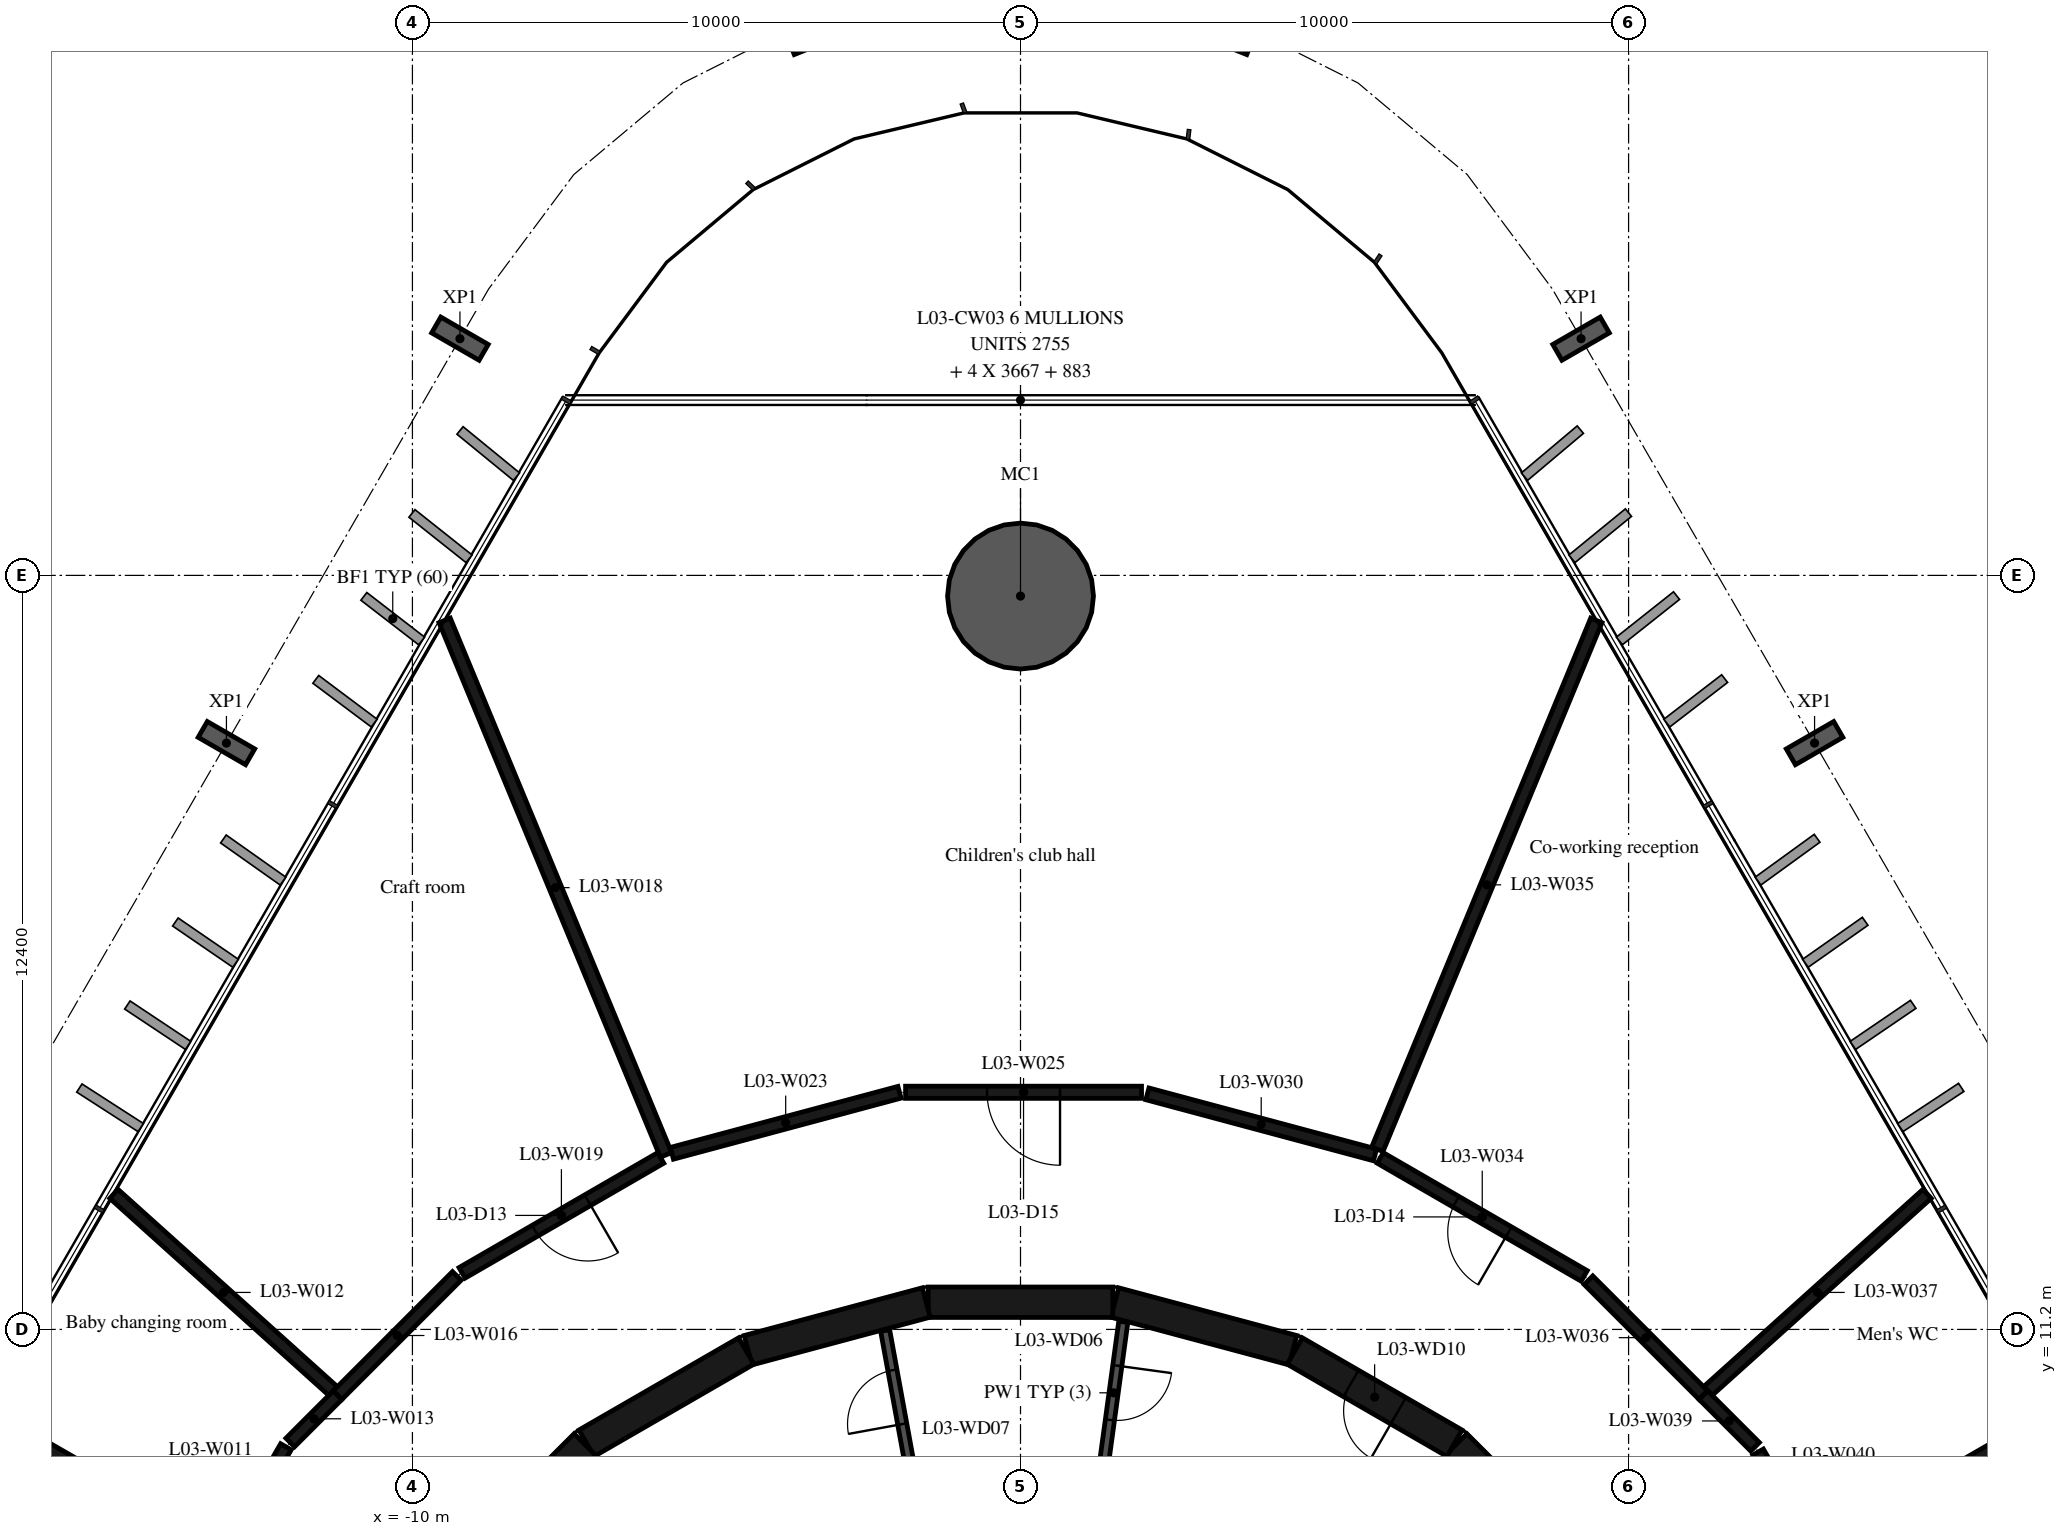
"""IFC4 building model, lengths in metres.
Left out: names, types, materials, properties, quantities, classifications, styles, units other than length and angle.
Written with IfcOpenShell. Run it as: python <this file> out.ifc"""

import sys

from ifc_helpers import new_model, si_unit, direction, frame, frame_2d, origin, origin_2d, place, context, subcontext, project, spatial, rectangle, hollow_circle, i_section, extrude, element, fill, save


model = new_model("IFC4")
c1 = context("Model", 3, precision=1e-05, world=origin(), true_north=direction((0.0, 1.0)))
c2 = subcontext(c1, "Body", "Model", "MODEL_VIEW")
j1 = project(units=[si_unit("LENGTHUNIT", "METRE"), si_unit("PLANEANGLEUNIT", "RADIAN")], contexts=[c1])
p1 = place(None, origin())
s1 = spatial("IfcSite", under=j1, at=p1, CompositionType="ELEMENT")
p2 = place(p1, origin())
s2 = spatial("IfcBuilding", under=s1, at=p2, CompositionType="ELEMENT")
p3 = place(p2, frame((0.0, 0.0, 18.6)))
s3 = spatial("IfcBuildingStorey", under=s2, at=p3, CompositionType="ELEMENT", Elevation=18.6)
p4 = place(p3, frame((0.0, 23.26, -0.38), z_axis=(0.0, 0.0, 1.0), x_axis=(1.0, 0.0, 0.0)))
e1 = element("IfcColumn", 1, at=p4, inside=s3, PredefinedType="COLUMN", context=c2, shape_type="SweptSolid", body=[
    extrude(hollow_circle(Radius=1.2, WallThickness=0.06, at=origin_2d()), origin(), (0.0, 0.0, 1.0), 4.8),
])
for number, where, z_axis, x_axis in (
    (2, (13.059, 20.842, -0.38), (0.0, 0.0, 1.0), (0.5, -0.866, 0.0)),
    (3, (9.219, 27.493, -0.38), (0.0, 0.0, 1.0), (0.5, -0.866, 0.0)),
    (4, (3.748, 32.639, -0.38), (0.0, 0.0, 1.0), (0.929, -0.371, 0.0)),
    (5, (-3.748, 32.639, -0.38), (0.0, 0.0, 1.0), (0.929, 0.371, 0.0)),
    (6, (-9.219, 27.493, -0.38), (0.0, 0.0, 1.0), (0.5, 0.866, 0.0)),
    (7, (-13.059, 20.842, -0.38), (0.0, 0.0, 1.0), (0.5, 0.866, 0.0)),
):
    element("IfcColumn", number, at=place(p3, frame(where, z_axis=z_axis, x_axis=x_axis)), inside=s3, PredefinedType="COLUMN", context=c2, shape_type="SweptSolid", body=[
        extrude(i_section(OverallWidth=0.3, OverallDepth=0.9, WebThickness=0.019, FlangeThickness=0.035, FilletRadius=0.03, at=origin_2d()), origin(), (0.0, 0.0, 1.0), 4.8),
    ])
p5 = place(p3, frame((9.308, 7.164, 0.0), z_axis=(0.0, 0.0, 1.0), x_axis=(-0.707106781187, 0.707106781187, 0.0)))
e8 = element("IfcWall", 8, at=p5, inside=s3, PredefinedType="SHEAR", context=c2, shape_type="SweptSolid", body=[
    extrude(rectangle(XDim=3.032, YDim=0.5, at=frame_2d((1.516, 0.0))), origin(), (0.0, 0.0, 1.0), 4.42),
])
p6 = place(p5, frame((0.416, 0.0, 0.0)))
e9 = element("IfcOpeningElement", 9, at=p6, cuts=e8, PredefinedType="OPENING", context=c2, shape_type="SweptSolid", body=[
    extrude(rectangle(XDim=1.2, YDim=2.1, at=frame_2d((0.6, 1.05))), frame((0.0, 0.26, 0.0), z_axis=(0.0, -1.0, 0.0), x_axis=(1.0, 0.0, 0.0)), (0.0, 0.0, 1.0), 0.52),
])
p7 = place(p3, frame((7.137, 9.329, 0.0), z_axis=(0.0, 0.0, 1.0), x_axis=(-0.865975092491, 0.500087131594, 0.0)))
e10 = element("IfcWall", 10, at=p7, inside=s3, PredefinedType="SHEAR", context=c2, shape_type="SweptSolid", body=[
    extrude(rectangle(XDim=3.033, YDim=0.5, at=frame_2d((1.516, 0.0))), origin(), (0.0, 0.0, 1.0), 4.42),
])
p8 = place(p7, frame((1.066, 0.0, 0.0)))
e11 = element("IfcOpeningElement", 11, at=p8, cuts=e10, PredefinedType="OPENING", context=c2, shape_type="SweptSolid", body=[
    extrude(rectangle(XDim=0.9, YDim=2.1, at=frame_2d((0.45, 1.05))), frame((0.0, 0.26, 0.0), z_axis=(0.0, -1.0, 0.0), x_axis=(1.0, 0.0, 0.0)), (0.0, 0.0, 1.0), 0.52),
])
for number, where, z_axis, x_axis in (
    (12, (4.479, 10.858, 0.0), (0.0, 0.0, 1.0), (-0.966, 0.259, 0.0)),
    (13, (1.516, 11.647, 0.0), (0.0, 0.0, 1.0), (-1.0, 0.0, 0.0)),
    (14, (-1.55, 11.643, 0.0), (0.0, 0.0, 1.0), (-0.966, -0.259, 0.0)),
    (15, (-4.51, 10.845, 0.0), (0.0, 0.0, 1.0), (-0.866, -0.5, 0.0)),
):
    element("IfcWall", number, at=place(p3, frame(where, z_axis=z_axis, x_axis=x_axis)), inside=s3, PredefinedType="SHEAR", context=c2, shape_type="SweptSolid", body=[
        extrude(rectangle(XDim=3.033, YDim=0.5, at=frame_2d((1.516, 0.0))), origin(), (0.0, 0.0, 1.0), 4.42),
    ])
p9 = place(p3, frame((-7.164, 9.308, 0.0), z_axis=(0.0, 0.0, 1.0), x_axis=(-0.707106781187, -0.707106781187, 0.0)))
e16 = element("IfcWall", 16, at=p9, inside=s3, PredefinedType="SHEAR", context=c2, shape_type="SweptSolid", body=[
    extrude(rectangle(XDim=3.032, YDim=0.5, at=frame_2d((1.516, 0.0))), origin(), (0.0, 0.0, 1.0), 4.42),
])
p10 = place(p9, frame((1.416, 0.0, 0.0)))
e17 = element("IfcOpeningElement", 17, at=p10, cuts=e16, PredefinedType="OPENING", context=c2, shape_type="SweptSolid", body=[
    extrude(rectangle(XDim=1.2, YDim=2.1, at=frame_2d((0.6, 1.05))), frame((0.0, 0.26, 0.0), z_axis=(0.0, -1.0, 0.0), x_axis=(1.0, 0.0, 0.0)), (0.0, 0.0, 1.0), 0.52),
])
p11 = place(p3, frame((1.691, 11.326, 0.0), z_axis=(0.0, 0.0, 1.0), x_axis=(-0.135344253201, -0.990798633994, 0.0)))
e18 = element("IfcWall", 18, at=p11, inside=s3, PredefinedType="PARTITIONING", context=c2, shape_type="SweptSolid", body=[
    extrude(rectangle(XDim=2.358, YDim=0.15, at=frame_2d((1.179, 0.0))), origin(), (0.0, 0.0, 1.0), 4.42),
])
p12 = place(p11, frame((0.729, 0.0, 0.0)))
e19 = element("IfcOpeningElement", 19, at=p12, cuts=e18, PredefinedType="OPENING", context=c2, shape_type="SweptSolid", body=[
    extrude(rectangle(XDim=0.9, YDim=2.1, at=frame_2d((0.45, 1.05))), frame((0.0, 0.085, 0.0), z_axis=(0.0, -1.0, 0.0), x_axis=(1.0, 0.0, 0.0)), (0.0, 0.0, 1.0), 0.17),
])
p13 = place(p3, frame((-1.825, 8.99, 0.0), z_axis=(0.0, 0.0, 1.0), x_axis=(-0.179955206115, 0.983674805915, 0.0)))
e20 = element("IfcWall", 20, at=p13, inside=s3, PredefinedType="PARTITIONING", context=c2, shape_type="SweptSolid", body=[
    extrude(rectangle(XDim=2.229, YDim=0.15, at=frame_2d((1.115, 0.0))), origin(), (0.0, 0.0, 1.0), 4.42),
])
p14 = place(p13, frame((0.665, 0.0, 0.0)))
e21 = element("IfcOpeningElement", 21, at=p14, cuts=e20, PredefinedType="OPENING", context=c2, shape_type="SweptSolid", body=[
    extrude(rectangle(XDim=0.9, YDim=2.1, at=frame_2d((0.45, 1.05))), frame((0.0, 0.085, 0.0), z_axis=(0.0, -1.0, 0.0), x_axis=(1.0, 0.0, 0.0)), (0.0, 0.0, 1.0), 0.17),
])
p15 = place(p3, frame((-13.07, 7.55, 0.0), z_axis=(0.0, 0.0, 1.0), x_axis=(-0.866877794005, 0.498520701938, 0.0)))
e22 = element("IfcWall", 22, at=p15, inside=s3, PredefinedType="PARTITIONING", context=c2, shape_type="SweptSolid", body=[
    extrude(rectangle(XDim=4.533, YDim=0.2, at=frame_2d((2.267, 0.0))), origin(), (0.0, 0.0, 1.0), 4.42),
])
p16 = place(p3, frame((-12.08, 9.27, 0.0), z_axis=(0.0, 0.0, 1.0), x_axis=(-0.49878752461, -0.86672429601, 0.0)))
e23 = element("IfcWall", 23, at=p16, inside=s3, PredefinedType="PARTITIONING", context=c2, shape_type="SweptSolid", body=[
    extrude(rectangle(XDim=1.885, YDim=0.2, at=frame_2d((0.942, 0.0))), origin(), (0.0, 0.0, 1.0), 4.42),
])
p17 = place(p16, frame((0.492, 0.0, 0.0)))
e24 = element("IfcOpeningElement", 24, at=p17, cuts=e23, PredefinedType="OPENING", context=c2, shape_type="SweptSolid", body=[
    extrude(rectangle(XDim=0.9, YDim=2.1, at=frame_2d((0.45, 1.05))), frame((0.0, 0.11, 0.0), z_axis=(0.0, -1.0, 0.0), x_axis=(1.0, 0.0, 0.0)), (0.0, 0.0, 1.0), 0.22),
])
p18 = place(p3, frame((-11.304, 10.187, 0.0), z_axis=(0.0, 0.0, 1.0), x_axis=(-0.743474354937, 0.668764445489, 0.0)))
e25 = element("IfcWall", 25, at=p18, inside=s3, PredefinedType="PARTITIONING", context=c2, shape_type="SweptSolid", body=[
    extrude(rectangle(XDim=4.849, YDim=0.2, at=frame_2d((2.425, 0.0))), origin(), (0.0, 0.0, 1.0), 4.03),
])
p19 = place(p3, frame((-11.23, 10.12, 0.0), z_axis=(0.0, 0.0, 1.0), x_axis=(-0.707106781187, -0.707106781187, 0.0)))
e26 = element("IfcWall", 26, at=p19, inside=s3, PredefinedType="PARTITIONING", context=c2, shape_type="SweptSolid", body=[
    extrude(rectangle(XDim=1.102, YDim=0.2, at=frame_2d((0.551, 0.0))), origin(), (0.0, 0.0, 1.0), 4.42),
])
p20 = place(p3, frame((-9.27, 12.08, 0.0), z_axis=(0.0, 0.0, 1.0), x_axis=(-0.707106781187, -0.707106781187, 0.0)))
e27 = element("IfcWall", 27, at=p20, inside=s3, PredefinedType="PARTITIONING", context=c2, shape_type="SweptSolid", body=[
    extrude(rectangle(XDim=2.772, YDim=0.2, at=frame_2d((1.386, 0.0))), origin(), (0.0, 0.0, 1.0), 4.42),
])
p21 = place(p3, frame((-5.83, 14.07, 0.0), z_axis=(0.0, 0.0, 1.0), x_axis=(-0.382588257379, 0.923918949538, 0.0)))
e28 = element("IfcWall", 28, at=p21, inside=s3, PredefinedType="PARTITIONING", context=c2, shape_type="SweptSolid", body=[
    extrude(rectangle(XDim=9.514, YDim=0.2, at=frame_2d((4.757, 0.0))), origin(), (0.0, 0.0, 1.0), 4.42),
])
p22 = place(p3, frame((-5.917, 14.02, 0.0), z_axis=(0.0, 0.0, 1.0), x_axis=(-0.865591582237, -0.500750649286, 0.0)))
e29 = element("IfcWall", 29, at=p22, inside=s3, PredefinedType="PARTITIONING", context=c2, shape_type="SweptSolid", body=[
    extrude(rectangle(XDim=3.774, YDim=0.2, at=frame_2d((1.887, 0.0))), origin(), (0.0, 0.0, 1.0), 4.42),
])
p23 = place(p22, frame((1.387, 0.0, 0.0)))
e30 = element("IfcOpeningElement", 30, at=p23, cuts=e29, PredefinedType="OPENING", context=c2, shape_type="SweptSolid", body=[
    extrude(rectangle(XDim=1.0, YDim=2.1, at=frame_2d((0.5, 1.05))), frame((0.0, 0.11, 0.0), z_axis=(0.0, -1.0, 0.0), x_axis=(1.0, 0.0, 0.0)), (0.0, 0.0, 1.0), 0.22),
])
p24 = place(p3, frame((-1.99, 15.1, 0.0), z_axis=(0.0, 0.0, 1.0), x_axis=(-0.96585437197, -0.259085569159, 0.0)))
e31 = element("IfcWall", 31, at=p24, inside=s3, PredefinedType="PARTITIONING", context=c2, shape_type="SweptSolid", body=[
    extrude(rectangle(XDim=3.876, YDim=0.2, at=frame_2d((1.938, 0.0))), origin(), (0.0, 0.0, 1.0), 4.42),
])
p25 = place(p3, frame((1.99, 15.1, 0.0), z_axis=(0.0, 0.0, 1.0), x_axis=(-1.0, 0.0, 0.0)))
e32 = element("IfcWall", 32, at=p25, inside=s3, PredefinedType="PARTITIONING", context=c2, shape_type="SweptSolid", body=[
    extrude(rectangle(XDim=3.88, YDim=0.2, at=frame_2d((1.94, 0.0))), origin(), (0.0, 0.0, 1.0), 4.42),
])
p26 = place(p25, frame((1.34, 0.0, 0.0)))
e33 = element("IfcOpeningElement", 33, at=p26, cuts=e32, PredefinedType="OPENING", context=c2, shape_type="SweptSolid", body=[
    extrude(rectangle(XDim=1.2, YDim=2.1, at=frame_2d((0.6, 1.05))), frame((0.0, 0.11, 0.0), z_axis=(0.0, -1.0, 0.0), x_axis=(1.0, 0.0, 0.0)), (0.0, 0.0, 1.0), 0.22),
])
p27 = place(p3, frame((5.83, 14.07, 0.0), z_axis=(0.0, 0.0, 1.0), x_axis=(-0.965870133458, 0.259026804199, 0.0)))
e34 = element("IfcWall", 34, at=p27, inside=s3, PredefinedType="PARTITIONING", context=c2, shape_type="SweptSolid", body=[
    extrude(rectangle(XDim=3.876, YDim=0.2, at=frame_2d((1.938, 0.0))), origin(), (0.0, 0.0, 1.0), 4.42),
])
p28 = place(p3, frame((9.27, 12.08, 0.0), z_axis=(0.0, 0.0, 1.0), x_axis=(-0.865601686425, 0.500733182901, 0.0)))
e35 = element("IfcWall", 35, at=p28, inside=s3, PredefinedType="PARTITIONING", context=c2, shape_type="SweptSolid", body=[
    extrude(rectangle(XDim=3.874, YDim=0.2, at=frame_2d((1.937, 0.0))), origin(), (0.0, 0.0, 1.0), 4.42),
])
p29 = place(p28, frame((1.437, 0.0, 0.0)))
e36 = element("IfcOpeningElement", 36, at=p29, cuts=e35, PredefinedType="OPENING", context=c2, shape_type="SweptSolid", body=[
    extrude(rectangle(XDim=1.0, YDim=2.1, at=frame_2d((0.5, 1.05))), frame((0.0, 0.11, 0.0), z_axis=(0.0, -1.0, 0.0), x_axis=(1.0, 0.0, 0.0)), (0.0, 0.0, 1.0), 0.22),
])
p30 = place(p3, frame((9.47, 22.86, 0.0), z_axis=(0.0, 0.0, 1.0), x_axis=(-0.382599926304, -0.923914117433, 0.0)))
e37 = element("IfcWall", 37, at=p30, inside=s3, PredefinedType="PARTITIONING", context=c2, shape_type="SweptSolid", body=[
    extrude(rectangle(XDim=9.414, YDim=0.2, at=frame_2d((4.707, 0.0))), origin(), (0.0, 0.0, 1.0), 4.42),
])
p31 = place(p3, frame((11.23, 10.12, 0.0), z_axis=(0.0, 0.0, 1.0), x_axis=(-0.707106781187, 0.707106781187, 0.0)))
e38 = element("IfcWall", 38, at=p31, inside=s3, PredefinedType="PARTITIONING", context=c2, shape_type="SweptSolid", body=[
    extrude(rectangle(XDim=2.672, YDim=0.2, at=frame_2d((1.336, 0.0))), origin(), (0.0, 0.0, 1.0), 4.42),
])
p32 = place(p3, frame((11.304, 10.187, 0.0), z_axis=(0.0, 0.0, 1.0), x_axis=(0.743474354937, 0.668764445489, 0.0)))
e39 = element("IfcWall", 39, at=p32, inside=s3, PredefinedType="PARTITIONING", context=c2, shape_type="SweptSolid", body=[
    extrude(rectangle(XDim=4.849, YDim=0.2, at=frame_2d((2.425, 0.0))), origin(), (0.0, 0.0, 1.0), 4.03),
])
p33 = place(p3, frame((12.08, 9.27, 0.0), z_axis=(0.0, 0.0, 1.0), x_axis=(-0.707106781187, 0.707106781187, 0.0)))
e40 = element("IfcWall", 40, at=p33, inside=s3, PredefinedType="PARTITIONING", context=c2, shape_type="SweptSolid", body=[
    extrude(rectangle(XDim=1.202, YDim=0.2, at=frame_2d((0.601, 0.0))), origin(), (0.0, 0.0, 1.0), 4.42),
])
p34 = place(p3, frame((13.07, 7.55, 0.0), z_axis=(0.0, 0.0, 1.0), x_axis=(-0.498884838469, 0.866668285993, 0.0)))
e41 = element("IfcWall", 41, at=p34, inside=s3, PredefinedType="PARTITIONING", context=c2, shape_type="SweptSolid", body=[
    extrude(rectangle(XDim=1.885, YDim=0.2, at=frame_2d((0.942, 0.0))), origin(), (0.0, 0.0, 1.0), 4.42),
])
p35 = place(p34, frame((0.492, 0.0, 0.0)))
e42 = element("IfcOpeningElement", 42, at=p35, cuts=e41, PredefinedType="OPENING", context=c2, shape_type="SweptSolid", body=[
    extrude(rectangle(XDim=0.9, YDim=2.1, at=frame_2d((0.45, 1.05))), frame((0.0, 0.11, 0.0), z_axis=(0.0, -1.0, 0.0), x_axis=(1.0, 0.0, 0.0)), (0.0, 0.0, 1.0), 0.22),
])
p36 = place(p3, frame((13.157, 7.6, 0.0), z_axis=(0.0, 0.0, 1.0), x_axis=(0.866874176334, 0.498526992654, 0.0)))
e43 = element("IfcWall", 43, at=p36, inside=s3, PredefinedType="PARTITIONING", context=c2, shape_type="SweptSolid", body=[
    extrude(rectangle(XDim=4.433, YDim=0.2, at=frame_2d((2.217, 0.0))), origin(), (0.0, 0.0, 1.0), 4.42),
])
p37 = place(p12, origin())
e44 = element("IfcDoor", 44, at=p37, inside=s3, OperationType="SINGLE_SWING_LEFT", PredefinedType="DOOR", context=c2, shape_type="SweptSolid", body=[
    extrude(rectangle(XDim=0.9, YDim=2.1, at=frame_2d((0.45, 1.05))), frame((0.0, 0.025, 0.0), z_axis=(0.0, -1.0, 0.0), x_axis=(1.0, 0.0, 0.0)), (0.0, 0.0, 1.0), 0.05),
])
fill(e19, e44)
p38 = place(p14, origin())
e45 = element("IfcDoor", 45, at=p38, inside=s3, OperationType="SINGLE_SWING_RIGHT", PredefinedType="DOOR", context=c2, shape_type="SweptSolid", body=[
    extrude(rectangle(XDim=0.9, YDim=2.1, at=frame_2d((0.45, 1.05))), frame((0.0, 0.025, 0.0), z_axis=(0.0, -1.0, 0.0), x_axis=(1.0, 0.0, 0.0)), (0.0, 0.0, 1.0), 0.05),
])
fill(e21, e45)
p39 = place(p8, origin())
e46 = element("IfcDoor", 46, at=p39, inside=s3, OperationType="SINGLE_SWING_LEFT", PredefinedType="DOOR", context=c2, shape_type="SweptSolid", body=[
    extrude(rectangle(XDim=0.9, YDim=2.1, at=frame_2d((0.45, 1.05))), frame((0.0, 0.025, 0.0), z_axis=(0.0, -1.0, 0.0), x_axis=(1.0, 0.0, 0.0)), (0.0, 0.0, 1.0), 0.05),
])
fill(e11, e46)
p40 = place(p23, origin())
e47 = element("IfcDoor", 47, at=p40, inside=s3, OperationType="SINGLE_SWING_LEFT", PredefinedType="DOOR", context=c2, shape_type="SweptSolid", body=[
    extrude(rectangle(XDim=1.0, YDim=2.1, at=frame_2d((0.5, 1.05))), frame((0.0, 0.025, 0.0), z_axis=(0.0, -1.0, 0.0), x_axis=(1.0, 0.0, 0.0)), (0.0, 0.0, 1.0), 0.05),
])
fill(e30, e47)
p41 = place(p29, origin())
e48 = element("IfcDoor", 48, at=p41, inside=s3, OperationType="SINGLE_SWING_LEFT", PredefinedType="DOOR", context=c2, shape_type="SweptSolid", body=[
    extrude(rectangle(XDim=1.0, YDim=2.1, at=frame_2d((0.5, 1.05))), frame((0.0, 0.025, 0.0), z_axis=(0.0, -1.0, 0.0), x_axis=(1.0, 0.0, 0.0)), (0.0, 0.0, 1.0), 0.05),
])
fill(e36, e48)
p42 = place(p26, origin())
e49 = element("IfcDoor", 49, at=p42, inside=s3, OperationType="SINGLE_SWING_LEFT", PredefinedType="DOOR", context=c2, shape_type="SweptSolid", body=[
    extrude(rectangle(XDim=1.2, YDim=2.1, at=frame_2d((0.6, 1.05))), frame((0.0, 0.025, 0.0), z_axis=(0.0, -1.0, 0.0), x_axis=(1.0, 0.0, 0.0)), (0.0, 0.0, 1.0), 0.05),
])
fill(e33, e49)
save(model, sys.argv[1])
